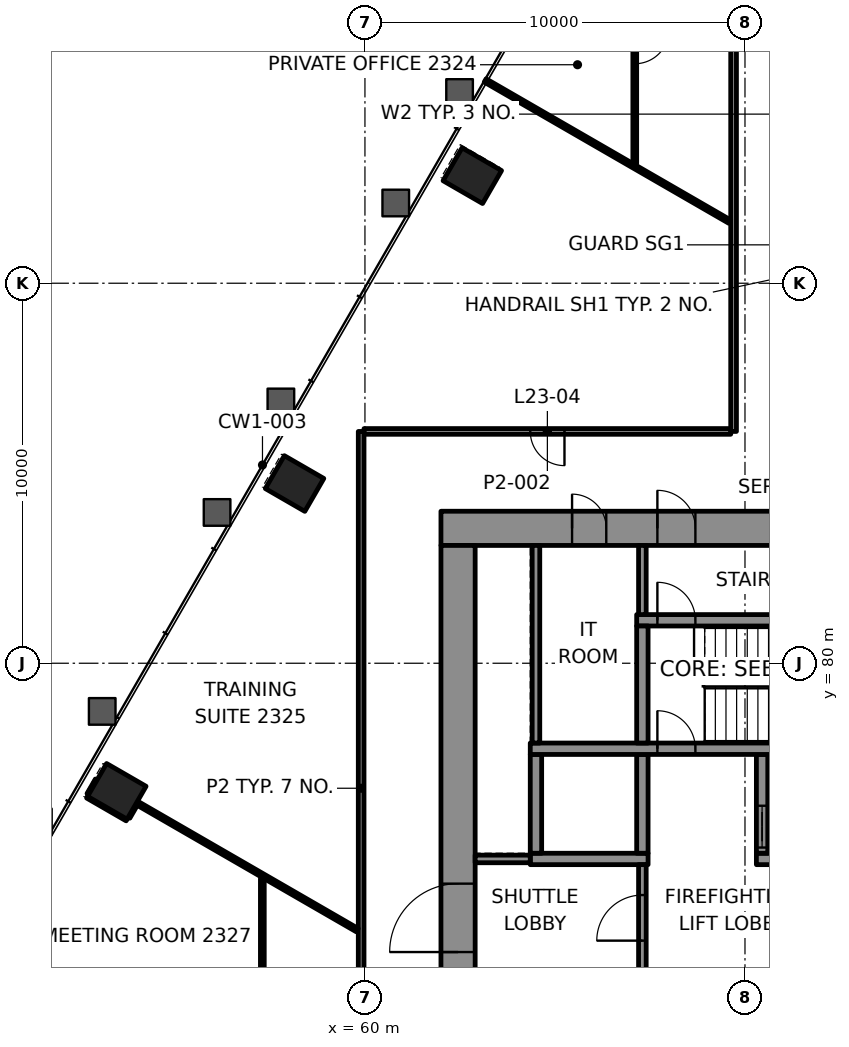
"""IFC4 building model, lengths in metres.
Left out: names, types, materials, properties, quantities, classifications, styles, units other than length and angle.
Written with IfcOpenShell. Run it as: python <this file> out.ifc"""

import sys

from ifc_helpers import new_model, si_unit, direction, frame, frame_2d, origin, origin_2d, place, context, subcontext, project, spatial, rectangle, extrude, element, fill, save


model = new_model("IFC4")
c1 = context("Model", 3, precision=1e-05, world=origin(), true_north=direction((0.0, 1.0)))
c2 = subcontext(c1, "Body", "Model", "MODEL_VIEW")
j1 = project(units=[si_unit("LENGTHUNIT", "METRE"), si_unit("PLANEANGLEUNIT", "RADIAN")], contexts=[c1])
p1 = place(None, origin())
s1 = spatial("IfcSite", under=j1, at=p1, CompositionType="ELEMENT")
p2 = place(p1, origin())
s2 = spatial("IfcBuilding", under=s1, at=p2, CompositionType="ELEMENT")
p3 = place(p2, frame((0.0, 0.0, 103.0)))
s3 = spatial("IfcBuildingStorey", under=s2, at=p3, CompositionType="ELEMENT", Elevation=103.0)
for number, where, z_axis, x_axis in (
    (1, (62.825, 92.83, -0.0), (0.0, 0.0, 1.0), (-0.5, -0.866, 0.0)),
    (2, (58.148, 84.729, -0.0), (0.0, 0.0, 1.0), (-0.5, -0.866, 0.0)),
    (3, (53.471, 76.628, -0.0), (0.0, 0.0, 1.0), (-0.5, -0.866, 0.0)),
):
    element("IfcColumn", number, at=place(p3, frame(where, z_axis=z_axis, x_axis=x_axis)), inside=s3, PredefinedType="COLUMN", context=c2, shape_type="SweptSolid", body=[
        extrude(rectangle(XDim=1.0, YDim=1.2, at=origin_2d()), origin(), (0.0, 0.0, 1.0), 4.2),
    ])
p4 = place(p3, frame((62.0, 83.55, 0.0), z_axis=(0.0, 0.0, 1.0), x_axis=(1.0, 0.0, 0.0)))
e4 = element("IfcWall", 4, at=p4, inside=s3, PredefinedType="SHEAR", context=c2, shape_type="SweptSolid", body=[
    extrude(rectangle(XDim=26.0, YDim=0.9, at=frame_2d((13.0, 0.0))), origin(), (0.0, 0.0, 1.0), 4.0),
])
p5 = place(p4, frame((5.695, 0.0, 0.0)))
e5 = element("IfcOpeningElement", 5, at=p5, cuts=e4, PredefinedType="OPENING", context=c2, shape_type="SweptSolid", body=[
    extrude(rectangle(XDim=1.0, YDim=2.1, at=frame_2d((0.5, 1.05))), frame((0.0, 0.46, 0.0), z_axis=(0.0, -1.0, 0.0), x_axis=(1.0, 0.0, 0.0)), (0.0, 0.0, 1.0), 0.92),
])
p6 = place(p4, frame((19.505, 0.0, 0.0)))
e6 = element("IfcOpeningElement", 6, at=p6, cuts=e4, PredefinedType="OPENING", context=c2, shape_type="SweptSolid", body=[
    extrude(rectangle(XDim=1.0, YDim=2.1, at=frame_2d((0.5, 1.05))), frame((0.0, 0.46, 0.0), z_axis=(0.0, -1.0, 0.0), x_axis=(1.0, 0.0, 0.0)), (0.0, 0.0, 1.0), 0.92),
])
p7 = place(p4, frame((3.45, 0.0, 0.0)))
e7 = element("IfcOpeningElement", 7, at=p7, cuts=e4, PredefinedType="OPENING", context=c2, shape_type="SweptSolid", body=[
    extrude(rectangle(XDim=0.9, YDim=2.1, at=frame_2d((0.45, 1.05))), frame((0.0, 0.46, 0.0), z_axis=(0.0, -1.0, 0.0), x_axis=(1.0, 0.0, 0.0)), (0.0, 0.0, 1.0), 0.92),
])
p8 = place(p4, frame((12.65, 0.0, 0.0)))
e8 = element("IfcOpeningElement", 8, at=p8, cuts=e4, PredefinedType="OPENING", context=c2, shape_type="SweptSolid", body=[
    extrude(rectangle(XDim=0.9, YDim=2.1, at=frame_2d((0.45, 1.05))), frame((0.0, 0.46, 0.0), z_axis=(0.0, -1.0, 0.0), x_axis=(1.0, 0.0, 0.0)), (0.0, 0.0, 1.0), 0.92),
])
p9 = place(p4, frame((22.55, 0.0, 0.0)))
e9 = element("IfcOpeningElement", 9, at=p9, cuts=e4, PredefinedType="OPENING", context=c2, shape_type="SweptSolid", body=[
    extrude(rectangle(XDim=0.9, YDim=2.1, at=frame_2d((0.45, 1.05))), frame((0.0, 0.46, 0.0), z_axis=(0.0, -1.0, 0.0), x_axis=(1.0, 0.0, 0.0)), (0.0, 0.0, 1.0), 0.92),
])
p10 = place(p3, frame((62.45, 66.9, 0.0), z_axis=(0.0, 0.0, 1.0), x_axis=(0.0, 1.0, 0.0)))
e10 = element("IfcWall", 10, at=p10, inside=s3, PredefinedType="SHEAR", context=c2, shape_type="SweptSolid", body=[
    extrude(rectangle(XDim=16.2, YDim=0.9, at=frame_2d((8.1, 0.0))), origin(), (0.0, 0.0, 1.0), 4.0),
])
p11 = place(p10, frame((5.5, 0.0, 0.0)))
e11 = element("IfcOpeningElement", 11, at=p11, cuts=e10, PredefinedType="OPENING", context=c2, shape_type="SweptSolid", body=[
    extrude(rectangle(XDim=1.8, YDim=2.1, at=frame_2d((0.9, 1.05))), frame((0.0, 0.46, 0.0), z_axis=(0.0, -1.0, 0.0), x_axis=(1.0, 0.0, 0.0)), (0.0, 0.0, 1.0), 0.92),
])
p12 = place(p3, frame((64.35, 74.85, 0.0), z_axis=(0.0, 0.0, 1.0), x_axis=(1.0, 0.0, 0.0)))
e12 = element("IfcWall", 12, at=p12, inside=s3, PredefinedType="SHEAR", context=c2, shape_type="SweptSolid", body=[
    extrude(rectangle(XDim=3.1, YDim=0.3, at=frame_2d((1.55, 0.0))), origin(), (0.0, 0.0, 1.0), 4.0),
])
p13 = place(p3, frame((70.3, 74.85, 0.0), z_axis=(0.0, 0.0, 1.0), x_axis=(1.0, 0.0, 0.0)))
e13 = element("IfcWall", 13, at=p13, inside=s3, PredefinedType="SHEAR", context=c2, shape_type="SweptSolid", body=[
    extrude(rectangle(XDim=16.8, YDim=0.3, at=frame_2d((8.4, 0.0))), origin(), (0.0, 0.0, 1.0), 4.0),
])
p14 = place(p13, frame((3.8, 0.0, 0.0)))
e14 = element("IfcOpeningElement", 14, at=p14, cuts=e13, PredefinedType="OPENING", context=c2, shape_type="SweptSolid", body=[
    extrude(rectangle(XDim=1.1, YDim=2.1, at=frame_2d((0.55, 1.05))), frame((0.0, 0.16, 0.0), z_axis=(0.0, -1.0, 0.0), x_axis=(1.0, 0.0, 0.0)), (0.0, 0.0, 1.0), 0.32),
])
p15 = place(p13, frame((12.2, 0.0, 0.0)))
e15 = element("IfcOpeningElement", 15, at=p15, cuts=e13, PredefinedType="OPENING", context=c2, shape_type="SweptSolid", body=[
    extrude(rectangle(XDim=1.1, YDim=2.1, at=frame_2d((0.55, 1.05))), frame((0.0, 0.16, 0.0), z_axis=(0.0, -1.0, 0.0), x_axis=(1.0, 0.0, 0.0)), (0.0, 0.0, 1.0), 0.32),
])
p16 = place(p13, frame((14.925, 0.0, 0.0)))
e16 = element("IfcOpeningElement", 16, at=p16, cuts=e13, PredefinedType="OPENING", context=c2, shape_type="SweptSolid", body=[
    extrude(rectangle(XDim=1.1, YDim=2.1, at=frame_2d((0.55, 1.05))), frame((0.0, 0.16, 0.0), z_axis=(0.0, -1.0, 0.0), x_axis=(1.0, 0.0, 0.0)), (0.0, 0.0, 1.0), 0.32),
])
for number, where, z_axis, x_axis in (
    (17, (64.5, 75.0, 0.0), (0.0, 0.0, 1.0), (0.0, 1.0, 0.0)),
    (18, (67.3, 75.0, 0.0), (0.0, 0.0, 1.0), (0.0, 1.0, 0.0)),
):
    element("IfcWall", number, at=place(p3, frame(where, z_axis=z_axis, x_axis=x_axis)), inside=s3, PredefinedType="SHEAR", context=c2, shape_type="SweptSolid", body=[
        extrude(rectangle(XDim=2.6, YDim=0.3, at=frame_2d((1.3, 0.0))), origin(), (0.0, 0.0, 1.0), 4.0),
    ])
p17 = place(p3, frame((70.45, 75.0, 0.0), z_axis=(0.0, 0.0, 1.0), x_axis=(0.0, 1.0, 0.0)))
e19 = element("IfcWall", 19, at=p17, inside=s3, PredefinedType="SHEAR", context=c2, shape_type="SweptSolid", body=[
    extrude(rectangle(XDim=2.6, YDim=0.3, at=frame_2d((1.3, 0.0))), origin(), (0.0, 0.0, 1.0), 4.0),
])
p18 = place(p17, frame((0.15, 0.0, 0.0)))
e20 = element("IfcOpeningElement", 20, at=p18, cuts=e19, PredefinedType="OPENING", context=c2, shape_type="SweptSolid", body=[
    extrude(rectangle(XDim=1.1, YDim=2.1, at=frame_2d((0.55, 1.05))), frame((0.0, 0.16, 0.0), z_axis=(0.0, -1.0, 0.0), x_axis=(1.0, 0.0, 0.0)), (0.0, 0.0, 1.0), 0.32),
])
p19 = place(p3, frame((64.35, 77.75, 0.0), z_axis=(0.0, 0.0, 1.0), x_axis=(1.0, 0.0, 0.0)))
e21 = element("IfcWall", 21, at=p19, inside=s3, PredefinedType="SHEAR", context=c2, shape_type="SweptSolid", body=[
    extrude(rectangle(XDim=22.75, YDim=0.3, at=frame_2d((11.375, 0.0))), origin(), (0.0, 0.0, 1.0), 4.0),
])
p20 = place(p19, frame((3.345, 0.0, 0.0)))
e22 = element("IfcOpeningElement", 22, at=p20, cuts=e21, PredefinedType="OPENING", context=c2, shape_type="SweptSolid", body=[
    extrude(rectangle(XDim=1.0, YDim=2.1, at=frame_2d((0.5, 1.05))), frame((0.0, 0.16, 0.0), z_axis=(0.0, -1.0, 0.0), x_axis=(1.0, 0.0, 0.0)), (0.0, 0.0, 1.0), 0.32),
])
p21 = place(p3, frame((67.15, 81.13, 0.0), z_axis=(0.0, 0.0, 1.0), x_axis=(1.0, 0.0, 0.0)))
e23 = element("IfcWall", 23, at=p21, inside=s3, PredefinedType="SHEAR", context=c2, shape_type="SweptSolid", body=[
    extrude(rectangle(XDim=6.91, YDim=0.3, at=frame_2d((3.455, 0.0))), origin(), (0.0, 0.0, 1.0), 4.0),
])
p22 = place(p21, frame((0.545, 0.0, 0.0)))
e24 = element("IfcOpeningElement", 24, at=p22, cuts=e23, PredefinedType="OPENING", context=c2, shape_type="SweptSolid", body=[
    extrude(rectangle(XDim=1.0, YDim=2.1, at=frame_2d((0.5, 1.05))), frame((0.0, 0.16, 0.0), z_axis=(0.0, -1.0, 0.0), x_axis=(1.0, 0.0, 0.0)), (0.0, 0.0, 1.0), 0.32),
])
p23 = place(p3, frame((67.3, 77.9, 0.0), z_axis=(0.0, 0.0, 1.0), x_axis=(0.0, 1.0, 0.0)))
e25 = element("IfcWall", 25, at=p23, inside=s3, PredefinedType="SHEAR", context=c2, shape_type="SweptSolid", body=[
    extrude(rectangle(XDim=3.08, YDim=0.3, at=frame_2d((1.54, 0.0))), origin(), (0.0, 0.0, 1.0), 4.0),
])
p24 = place(p3, frame((69.625, 86.1, 0.0), z_axis=(0.0, 0.0, 1.0), x_axis=(-1.0, 0.0, 0.0)))
e26 = element("IfcWall", 26, at=p24, inside=s3, PredefinedType="PARTITIONING", context=c2, shape_type="SweptSolid", body=[
    extrude(rectangle(XDim=9.649, YDim=0.15, at=frame_2d((4.825, 0.0))), origin(), (0.0, 0.0, 1.0), 3.4),
])
p25 = place(p24, frame((4.375, 0.0, 0.0)))
e27 = element("IfcOpeningElement", 27, at=p25, cuts=e26, PredefinedType="OPENING", context=c2, shape_type="SweptSolid", body=[
    extrude(rectangle(XDim=0.9, YDim=2.1, at=frame_2d((0.45, 1.05))), frame((0.0, 0.085, 0.0), z_axis=(0.0, -1.0, 0.0), x_axis=(1.0, 0.0, 0.0)), (0.0, 0.0, 1.0), 0.17),
])
p26 = place(p3, frame((53.771, 75.948, 0.0), z_axis=(0.0, 0.0, 1.0), x_axis=(0.500246304613, 0.865883153041, 0.0)))
e28 = element("IfcWall", 28, at=p26, inside=s3, PredefinedType="PARTITIONING", context=c2, shape_type="SweptSolid", body=[
    extrude(rectangle(XDim=0.39, YDim=0.1, at=frame_2d((0.195, 0.0))), origin(), (0.0, 0.0, 1.0), 3.4),
])
p27 = place(p3, frame((52.73, 76.545, 0.0), z_axis=(0.0, 0.0, 1.0), x_axis=(0.49999285859, 0.86602952684, 0.0)))
e29 = element("IfcWall", 29, at=p27, inside=s3, PredefinedType="PARTITIONING", context=c2, shape_type="SweptSolid", body=[
    extrude(rectangle(XDim=0.443, YDim=0.1, at=frame_2d((0.221, 0.0))), origin(), (0.0, 0.0, 1.0), 3.4),
])
p28 = place(p3, frame((69.7, 86.1, 0.0), z_axis=(0.0, 0.0, 1.0), x_axis=(0.0, 1.0, 0.0)))
e30 = element("IfcWall", 30, at=p28, inside=s3, PredefinedType="PARTITIONING", context=c2, shape_type="SweptSolid", body=[
    extrude(rectangle(XDim=10.599, YDim=0.15, at=frame_2d((5.3, 0.0))), origin(), (0.0, 0.0, 1.0), 3.322),
])
p29 = place(p3, frame((67.1, 99.3, 0.0), z_axis=(0.0, 0.0, 1.0), x_axis=(0.0, -1.0, 0.0)))
e31 = element("IfcWall", 31, at=p29, inside=s3, PredefinedType="PARTITIONING", context=c2, shape_type="SweptSolid", body=[
    extrude(rectangle(XDim=6.15, YDim=0.1, at=frame_2d((3.075, 0.0))), origin(), (0.0, 0.0, 1.0), 3.4),
])
p30 = place(p29, frame((2.625, 0.0, 0.0)))
e32 = element("IfcOpeningElement", 32, at=p30, cuts=e31, PredefinedType="OPENING", context=c2, shape_type="SweptSolid", body=[
    extrude(rectangle(XDim=0.9, YDim=2.1, at=frame_2d((0.45, 1.05))), frame((0.0, 0.06, 0.0), z_axis=(0.0, -1.0, 0.0), x_axis=(1.0, 0.0, 0.0)), (0.0, 0.0, 1.0), 0.12),
])
p31 = place(p3, frame((59.9, 67.321, 0.0), z_axis=(0.0, 0.0, 1.0), x_axis=(0.0, 1.0, 0.0)))
e33 = element("IfcWall", 33, at=p31, inside=s3, PredefinedType="PARTITIONING", context=c2, shape_type="SweptSolid", body=[
    extrude(rectangle(XDim=18.778, YDim=0.15, at=frame_2d((9.389, 0.0))), origin(), (0.0, 0.0, 1.0), 3.4),
])
p32 = place(p3, frame((57.3, 68.88, 0.0), z_axis=(0.0, 0.0, 1.0), x_axis=(0.0, 1.0, 0.0)))
e34 = element("IfcWall", 34, at=p32, inside=s3, PredefinedType="PARTITIONING", context=c2, shape_type="SweptSolid", body=[
    extrude(rectangle(XDim=5.45, YDim=0.1, at=frame_2d((2.725, 0.0))), origin(), (0.0, 0.0, 1.0), 3.4),
])
p33 = place(p3, frame((69.599, 91.62, 0.0), z_axis=(0.0, 0.0, 1.0), x_axis=(-0.866018724091, 0.500011569389, 0.0)))
e35 = element("IfcWall", 35, at=p33, inside=s3, PredefinedType="PARTITIONING", context=c2, shape_type="SweptSolid", body=[
    extrude(rectangle(XDim=7.431, YDim=0.1, at=frame_2d((3.716, 0.0))), origin(), (0.0, 0.0, 1.0), 3.165),
])
p34 = place(p3, frame((59.799, 72.975, 0.0), z_axis=(0.0, 0.0, 1.0), x_axis=(-0.866037071789, 0.499979789879, 0.0)))
e36 = element("IfcWall", 36, at=p34, inside=s3, PredefinedType="PARTITIONING", context=c2, shape_type="SweptSolid", body=[
    extrude(rectangle(XDim=6.707, YDim=0.1, at=frame_2d((3.354, 0.0))), origin(), (0.0, 0.0, 1.0), 3.4),
])
p35 = place(p3, frame((53.741, 75.896, 0.0), z_axis=(0.0, 0.0, 1.0), x_axis=(-0.866094119867, 0.499880961361, 0.0)))
e37 = element("IfcWall", 37, at=p35, inside=s3, PredefinedType="PARTITIONING", context=c2, shape_type="SweptSolid", body=[
    extrude(rectangle(XDim=1.2, YDim=0.1, at=frame_2d((0.6, 0.0))), origin(), (0.0, 0.0, 1.0), 3.165),
])
p36 = place(p3, frame((56.223, 68.288, 0.0), z_axis=(0.0, 0.0, 1.0), x_axis=(-0.866018922649, 0.500011225488, 0.0)))
e38 = element("IfcWall", 38, at=p36, inside=s3, PredefinedType="PARTITIONING", context=c2, shape_type="SweptSolid", body=[
    extrude(rectangle(XDim=7.513, YDim=0.1, at=frame_2d((3.757, 0.0))), origin(), (0.0, 0.0, 1.0), 3.165),
])
p37 = place(p3, frame((62.9, 74.85, 0.0), z_axis=(0.0, 0.0, 1.0), x_axis=(1.0, 0.0, 0.0)))
e39 = element("IfcWall", 39, at=p37, inside=s3, PredefinedType="PARTITIONING", context=c2, shape_type="SweptSolid", body=[
    extrude(rectangle(XDim=1.45, YDim=0.2, at=frame_2d((0.725, 0.0))), origin(), (0.0, 0.0, 1.0), 4.0),
])
p38 = place(p3, frame((64.5, 77.9, 0.0), z_axis=(0.0, 0.0, 1.0), x_axis=(0.0, 1.0, 0.0)))
e40 = element("IfcWall", 40, at=p38, inside=s3, PredefinedType="PARTITIONING", context=c2, shape_type="SweptSolid", body=[
    extrude(rectangle(XDim=5.2, YDim=0.2, at=frame_2d((2.6, 0.0))), origin(), (0.0, 0.0, 1.0), 4.0),
])
p39 = place(p3, frame((67.3, 71.9, 0.0), z_axis=(0.0, 0.0, 1.0), x_axis=(0.0, 1.0, 0.0)))
e41 = element("IfcWall", 41, at=p39, inside=s3, PredefinedType="PARTITIONING", context=c2, shape_type="SweptSolid", body=[
    extrude(rectangle(XDim=2.8, YDim=0.2, at=frame_2d((1.4, 0.0))), origin(), (0.0, 0.0, 1.0), 4.0),
])
p40 = place(p39, frame((0.8, 0.0, 0.0)))
e42 = element("IfcOpeningElement", 42, at=p40, cuts=e41, PredefinedType="OPENING", context=c2, shape_type="SweptSolid", body=[
    extrude(rectangle(XDim=1.2, YDim=2.1, at=frame_2d((0.6, 1.05))), frame((0.0, 0.11, 0.0), z_axis=(0.0, -1.0, 0.0), x_axis=(1.0, 0.0, 0.0)), (0.0, 0.0, 1.0), 0.22),
])
p41 = place(p3, frame((67.3, 81.28, 0.0), z_axis=(0.0, 0.0, 1.0), x_axis=(0.0, 1.0, 0.0)))
e43 = element("IfcWall", 43, at=p41, inside=s3, PredefinedType="PARTITIONING", context=c2, shape_type="SweptSolid", body=[
    extrude(rectangle(XDim=1.82, YDim=0.2, at=frame_2d((0.91, 0.0))), origin(), (0.0, 0.0, 1.0), 4.0),
])
p42 = place(p25, origin())
e44 = element("IfcDoor", 44, at=p42, inside=s3, OperationType="SINGLE_SWING_LEFT", PredefinedType="DOOR", context=c2, shape_type="SweptSolid", body=[
    extrude(rectangle(XDim=0.9, YDim=2.1, at=frame_2d((0.45, 1.05))), frame((0.0, 0.025, 0.0), z_axis=(0.0, -1.0, 0.0), x_axis=(1.0, 0.0, 0.0)), (0.0, 0.0, 1.0), 0.05),
])
fill(e27, e44)
p43 = place(p30, origin())
e45 = element("IfcDoor", 45, at=p43, inside=s3, OperationType="SINGLE_SWING_RIGHT", PredefinedType="DOOR", context=c2, shape_type="SweptSolid", body=[
    extrude(rectangle(XDim=0.9, YDim=2.1, at=frame_2d((0.45, 1.05))), frame((0.0, 0.025, 0.0), z_axis=(0.0, -1.0, 0.0), x_axis=(1.0, 0.0, 0.0)), (0.0, 0.0, 1.0), 0.05),
])
fill(e32, e45)
p44 = place(p18, origin())
e46 = element("IfcDoor", 46, at=p44, inside=s3, OperationType="DOUBLE_DOOR_SLIDING", PredefinedType="DOOR", context=c2, shape_type="SweptSolid", body=[
    extrude(rectangle(XDim=1.1, YDim=2.1, at=frame_2d((0.55, 1.05))), frame((0.0, 0.025, 0.0), z_axis=(0.0, -1.0, 0.0), x_axis=(1.0, 0.0, 0.0)), (0.0, 0.0, 1.0), 0.05),
])
fill(e20, e46)
p45 = place(p20, origin())
e47 = element("IfcDoor", 47, at=p45, inside=s3, OperationType="SINGLE_SWING_LEFT", PredefinedType="DOOR", context=c2, shape_type="SweptSolid", body=[
    extrude(rectangle(XDim=1.0, YDim=2.1, at=frame_2d((0.5, 1.05))), frame((0.0, 0.025, 0.0), z_axis=(0.0, -1.0, 0.0), x_axis=(1.0, 0.0, 0.0)), (0.0, 0.0, 1.0), 0.05),
])
fill(e22, e47)
p46 = place(p22, origin())
e48 = element("IfcDoor", 48, at=p46, inside=s3, OperationType="SINGLE_SWING_RIGHT", PredefinedType="DOOR", context=c2, shape_type="SweptSolid", body=[
    extrude(rectangle(XDim=1.0, YDim=2.1, at=frame_2d((0.5, 1.05))), frame((0.0, 0.025, 0.0), z_axis=(0.0, -1.0, 0.0), x_axis=(1.0, 0.0, 0.0)), (0.0, 0.0, 1.0), 0.05),
])
fill(e24, e48)
p47 = place(p5, origin())
e49 = element("IfcDoor", 49, at=p47, inside=s3, OperationType="SINGLE_SWING_LEFT", PredefinedType="DOOR", context=c2, shape_type="SweptSolid", body=[
    extrude(rectangle(XDim=1.0, YDim=2.1, at=frame_2d((0.5, 1.05))), frame((0.0, 0.17, 0.0), z_axis=(0.0, -1.0, 0.0), x_axis=(1.0, 0.0, 0.0)), (0.0, 0.0, 1.0), 0.34),
])
fill(e5, e49)
p48 = place(p40, origin())
e50 = element("IfcDoor", 50, at=p48, inside=s3, OperationType="SINGLE_SWING_RIGHT", PredefinedType="DOOR", context=c2, shape_type="SweptSolid", body=[
    extrude(rectangle(XDim=1.2, YDim=2.1, at=frame_2d((0.6, 1.05))), frame((0.0, 0.025, 0.0), z_axis=(0.0, -1.0, 0.0), x_axis=(1.0, 0.0, 0.0)), (0.0, 0.0, 1.0), 0.05),
])
fill(e42, e50)
p49 = place(p11, origin())
e51 = element("IfcDoor", 51, at=p49, inside=s3, OperationType="SINGLE_SWING_LEFT", PredefinedType="DOOR", context=c2, shape_type="SweptSolid", body=[
    extrude(rectangle(XDim=1.8, YDim=2.1, at=frame_2d((0.9, 1.05))), frame((0.0, 0.17, 0.0), z_axis=(0.0, -1.0, 0.0), x_axis=(1.0, 0.0, 0.0)), (0.0, 0.0, 1.0), 0.34),
])
fill(e11, e51)
p50 = place(p7, origin())
e52 = element("IfcDoor", 52, at=p50, inside=s3, OperationType="SINGLE_SWING_RIGHT", PredefinedType="DOOR", context=c2, shape_type="SweptSolid", body=[
    extrude(rectangle(XDim=0.9, YDim=2.1, at=frame_2d((0.45, 1.05))), frame((0.0, 0.17, 0.0), z_axis=(0.0, -1.0, 0.0), x_axis=(1.0, 0.0, 0.0)), (0.0, 0.0, 1.0), 0.34),
])
fill(e7, e52)
save(model, sys.argv[1])
